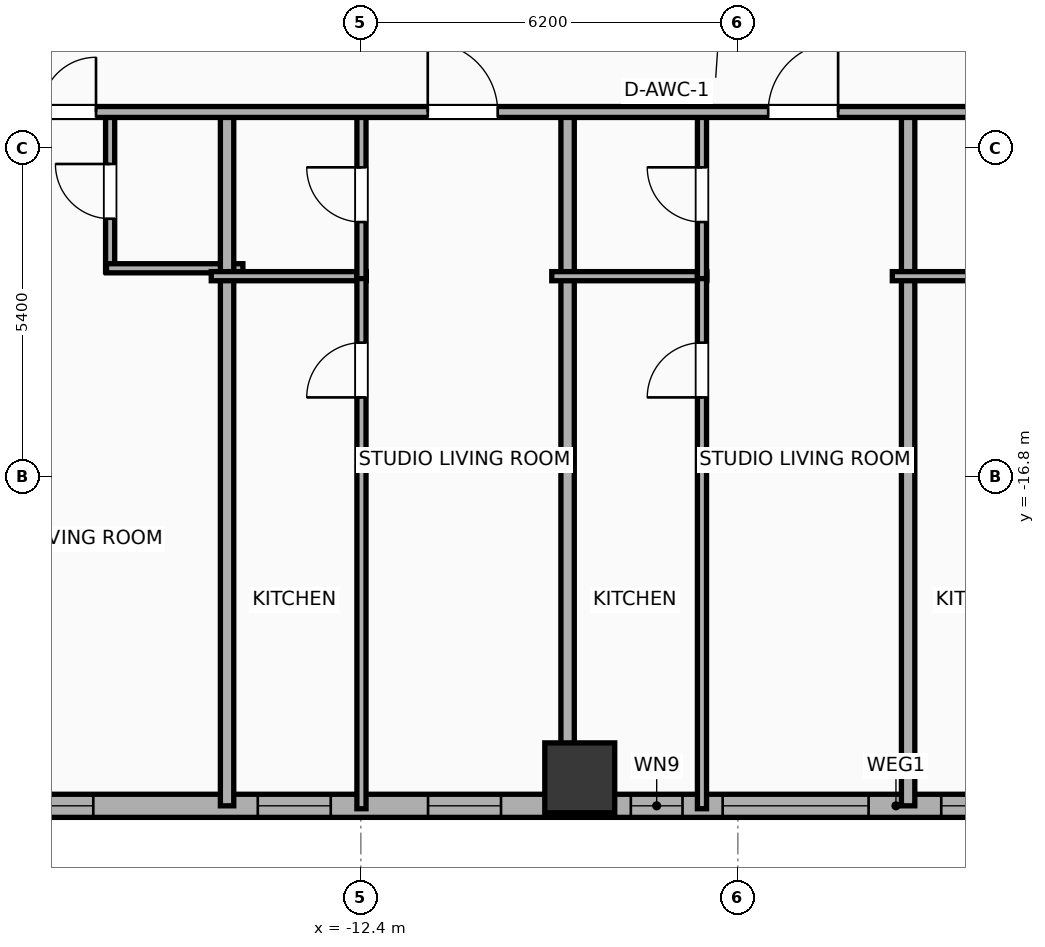
"""IFC4 building model, lengths in metres.
Left out: names, types, materials, properties, quantities, classifications, styles, units other than length and angle.
Written with IfcOpenShell. Run it as: python <this file> out.ifc"""

import sys

from ifc_helpers import new_model, si_unit, direction, frame, frame_2d, origin, origin_2d, place, context, subcontext, project, spatial, rectangle, hollow_rectangle, extrude, element, fill, save


model = new_model("IFC4")
c1 = context("Model", 3, precision=1e-05, world=origin(), true_north=direction((0.0, 1.0)))
c2 = subcontext(c1, "Body", "Model", "MODEL_VIEW")
j1 = project(units=[si_unit("LENGTHUNIT", "METRE"), si_unit("PLANEANGLEUNIT", "RADIAN")], contexts=[c1])
p1 = place(None, origin())
s1 = spatial("IfcSite", under=j1, at=p1, CompositionType="ELEMENT")
p2 = place(p1, origin())
s2 = spatial("IfcBuilding", under=s1, at=p2, CompositionType="ELEMENT")
p3 = place(p2, frame((0.0, 0.0, 29.9)))
s3 = spatial("IfcBuildingStorey", under=s2, at=p3, CompositionType="ELEMENT", Elevation=29.9)
p4 = place(p3, frame((-8.8, -21.75, 0.0), z_axis=(0.0, 0.0, 1.0), x_axis=(1.0, 0.0, 0.0)))
e1 = element("IfcColumn", 1, at=p4, inside=s3, PredefinedType="COLUMN", context=c2, shape_type="SweptSolid", body=[
    extrude(hollow_rectangle(XDim=1.15, YDim=1.15, WallThickness=0.04, at=origin_2d()), origin(), (0.0, 0.0, 1.0), 3.9),
])
p5 = place(p3, frame((22.381, -22.21, 0.0), z_axis=(0.0, 0.0, 1.0), x_axis=(-1.0, 0.0, 0.0)))
e2 = element("IfcWall", 2, at=p5, inside=s3, PredefinedType="ELEMENTEDWALL", context=c2, shape_type="SweptSolid", body=[
    extrude(rectangle(XDim=51.963, YDim=0.38, at=frame_2d((25.981, 0.0))), origin(), (0.0, 0.0, 1.0), 2.54),
])
p6 = place(p5, frame((5.81, 0.0, 0.75)))
e3 = element("IfcOpeningElement", 3, at=p6, cuts=e2, PredefinedType="OPENING", context=c2, shape_type="SweptSolid", body=[
    extrude(rectangle(XDim=2.4, YDim=1.63, at=frame_2d((1.2, 0.815))), frame((0.0, 0.2, 0.0), z_axis=(0.0, -1.0, 0.0), x_axis=(1.0, 0.0, 0.0)), (0.0, 0.0, 1.0), 0.4),
])
p7 = place(p5, frame((26.431, 0.0, 0.75)))
e4 = element("IfcOpeningElement", 4, at=p7, cuts=e2, PredefinedType="OPENING", context=c2, shape_type="SweptSolid", body=[
    extrude(rectangle(XDim=2.4, YDim=1.63, at=frame_2d((1.2, 0.815))), frame((0.0, 0.2, 0.0), z_axis=(0.0, -1.0, 0.0), x_axis=(1.0, 0.0, 0.0)), (0.0, 0.0, 1.0), 0.4),
])
p8 = place(p5, frame((42.952, 0.0, 0.75)))
e5 = element("IfcOpeningElement", 5, at=p8, cuts=e2, PredefinedType="OPENING", context=c2, shape_type="SweptSolid", body=[
    extrude(rectangle(XDim=2.4, YDim=1.63, at=frame_2d((1.2, 0.815))), frame((0.0, 0.2, 0.0), z_axis=(0.0, -1.0, 0.0), x_axis=(1.0, 0.0, 0.0)), (0.0, 0.0, 1.0), 0.4),
])
p9 = place(p5, frame((49.027, 0.0, 0.75)))
e6 = element("IfcOpeningElement", 6, at=p9, cuts=e2, PredefinedType="OPENING", context=c2, shape_type="SweptSolid", body=[
    extrude(rectangle(XDim=1.2, YDim=1.63, at=frame_2d((0.6, 0.815))), frame((0.0, 0.2, 0.0), z_axis=(0.0, -1.0, 0.0), x_axis=(1.0, 0.0, 0.0)), (0.0, 0.0, 1.0), 0.4),
])
p10 = place(p5, frame((46.476, 0.0, 0.75)))
e7 = element("IfcOpeningElement", 7, at=p10, cuts=e2, PredefinedType="OPENING", context=c2, shape_type="SweptSolid", body=[
    extrude(rectangle(XDim=1.2, YDim=1.63, at=frame_2d((0.6, 0.815))), frame((0.0, 0.2, 0.0), z_axis=(0.0, -1.0, 0.0), x_axis=(1.0, 0.0, 0.0)), (0.0, 0.0, 1.0), 0.4),
])
p11 = place(p5, frame((39.181, 0.0, 0.75)))
e8 = element("IfcOpeningElement", 8, at=p11, cuts=e2, PredefinedType="OPENING", context=c2, shape_type="SweptSolid", body=[
    extrude(rectangle(XDim=1.2, YDim=1.63, at=frame_2d((0.6, 0.815))), frame((0.0, 0.2, 0.0), z_axis=(0.0, -1.0, 0.0), x_axis=(1.0, 0.0, 0.0)), (0.0, 0.0, 1.0), 0.4),
])
p12 = place(p5, frame((32.476, 0.0, 0.75)))
e9 = element("IfcOpeningElement", 9, at=p12, cuts=e2, PredefinedType="OPENING", context=c2, shape_type="SweptSolid", body=[
    extrude(rectangle(XDim=1.2, YDim=1.63, at=frame_2d((0.6, 0.815))), frame((0.0, 0.2, 0.0), z_axis=(0.0, -1.0, 0.0), x_axis=(1.0, 0.0, 0.0)), (0.0, 0.0, 1.0), 0.4),
])
p13 = place(p5, frame((35.276, 0.0, 0.75)))
e10 = element("IfcOpeningElement", 10, at=p13, cuts=e2, PredefinedType="OPENING", context=c2, shape_type="SweptSolid", body=[
    extrude(rectangle(XDim=1.2, YDim=1.63, at=frame_2d((0.6, 0.815))), frame((0.0, 0.2, 0.0), z_axis=(0.0, -1.0, 0.0), x_axis=(1.0, 0.0, 0.0)), (0.0, 0.0, 1.0), 0.4),
])
p14 = place(p5, frame((29.491, 0.0, 0.75)))
e11 = element("IfcOpeningElement", 11, at=p14, cuts=e2, PredefinedType="OPENING", context=c2, shape_type="SweptSolid", body=[
    extrude(rectangle(XDim=0.85, YDim=1.63, at=frame_2d((0.425, 0.815))), frame((0.0, 0.2, 0.0), z_axis=(0.0, -1.0, 0.0), x_axis=(1.0, 0.0, 0.0)), (0.0, 0.0, 1.0), 0.4),
])
p15 = place(p5, frame((21.596, 0.0, 0.75)))
e12 = element("IfcOpeningElement", 12, at=p15, cuts=e2, PredefinedType="OPENING", context=c2, shape_type="SweptSolid", body=[
    extrude(rectangle(XDim=1.2, YDim=1.63, at=frame_2d((0.6, 0.815))), frame((0.0, 0.2, 0.0), z_axis=(0.0, -1.0, 0.0), x_axis=(1.0, 0.0, 0.0)), (0.0, 0.0, 1.0), 0.4),
])
p16 = place(p5, frame((24.036, 0.0, 0.75)))
e13 = element("IfcOpeningElement", 13, at=p16, cuts=e2, PredefinedType="OPENING", context=c2, shape_type="SweptSolid", body=[
    extrude(rectangle(XDim=1.2, YDim=1.63, at=frame_2d((0.6, 0.815))), frame((0.0, 0.2, 0.0), z_axis=(0.0, -1.0, 0.0), x_axis=(1.0, 0.0, 0.0)), (0.0, 0.0, 1.0), 0.4),
])
p17 = place(p5, frame((17.886, 0.0, 0.75)))
e14 = element("IfcOpeningElement", 14, at=p17, cuts=e2, PredefinedType="OPENING", context=c2, shape_type="SweptSolid", body=[
    extrude(rectangle(XDim=1.2, YDim=1.63, at=frame_2d((0.6, 0.815))), frame((0.0, 0.2, 0.0), z_axis=(0.0, -1.0, 0.0), x_axis=(1.0, 0.0, 0.0)), (0.0, 0.0, 1.0), 0.4),
])
p18 = place(p5, frame((15.086, 0.0, 0.75)))
e15 = element("IfcOpeningElement", 15, at=p18, cuts=e2, PredefinedType="OPENING", context=c2, shape_type="SweptSolid", body=[
    extrude(rectangle(XDim=1.2, YDim=1.63, at=frame_2d((0.6, 0.815))), frame((0.0, 0.2, 0.0), z_axis=(0.0, -1.0, 0.0), x_axis=(1.0, 0.0, 0.0)), (0.0, 0.0, 1.0), 0.4),
])
p19 = place(p5, frame((11.181, 0.0, 0.75)))
e16 = element("IfcOpeningElement", 16, at=p19, cuts=e2, PredefinedType="OPENING", context=c2, shape_type="SweptSolid", body=[
    extrude(rectangle(XDim=1.2, YDim=1.63, at=frame_2d((0.6, 0.815))), frame((0.0, 0.2, 0.0), z_axis=(0.0, -1.0, 0.0), x_axis=(1.0, 0.0, 0.0)), (0.0, 0.0, 1.0), 0.4),
])
p20 = place(p5, frame((3.886, 0.0, 0.75)))
e17 = element("IfcOpeningElement", 17, at=p20, cuts=e2, PredefinedType="OPENING", context=c2, shape_type="SweptSolid", body=[
    extrude(rectangle(XDim=1.2, YDim=1.63, at=frame_2d((0.6, 0.815))), frame((0.0, 0.2, 0.0), z_axis=(0.0, -1.0, 0.0), x_axis=(1.0, 0.0, 0.0)), (0.0, 0.0, 1.0), 0.4),
])
p21 = place(p5, frame((1.536, 0.0, 0.75)))
e18 = element("IfcOpeningElement", 18, at=p21, cuts=e2, PredefinedType="OPENING", context=c2, shape_type="SweptSolid", body=[
    extrude(rectangle(XDim=1.2, YDim=1.63, at=frame_2d((0.6, 0.815))), frame((0.0, 0.2, 0.0), z_axis=(0.0, -1.0, 0.0), x_axis=(1.0, 0.0, 0.0)), (0.0, 0.0, 1.0), 0.4),
])
p22 = place(p3, frame((-16.523, -13.43, 0.0), z_axis=(0.0, 0.0, 1.0), x_axis=(0.0, 1.0, 0.0)))
e19 = element("IfcWall", 19, at=p22, inside=s3, PredefinedType="PLUMBINGWALL", context=c2, shape_type="SweptSolid", body=[
    extrude(rectangle(XDim=2.65, YDim=0.15, at=frame_2d((1.325, 0.0))), origin(), (0.0, 0.0, 1.0), 3.65),
])
p23 = place(p22, frame((0.875, 0.0, 0.0)))
e20 = element("IfcOpeningElement", 20, at=p23, cuts=e19, PredefinedType="OPENING", context=c2, shape_type="SweptSolid", body=[
    extrude(rectangle(XDim=0.9, YDim=2.05, at=frame_2d((0.45, 1.025))), frame((0.0, 0.085, 0.0), z_axis=(0.0, -1.0, 0.0), x_axis=(1.0, 0.0, 0.0)), (0.0, 0.0, 1.0), 0.17),
])
p24 = place(p3, frame((-16.583, -13.37, 0.0), z_axis=(0.0, 0.0, 1.0), x_axis=(1.0, 0.0, 0.0)))
e21 = element("IfcWall", 21, at=p24, inside=s3, PredefinedType="PLUMBINGWALL", context=c2, shape_type="SweptSolid", body=[
    extrude(rectangle(XDim=2.243, YDim=0.15, at=frame_2d((1.122, 0.0))), origin(), (0.0, 0.0, 1.0), 3.65),
])
p25 = place(p3, frame((-14.6, -22.21, 0.0), z_axis=(0.0, 0.0, 1.0), x_axis=(0.0, 1.0, 0.0)))
e22 = element("IfcWall", 22, at=p25, inside=s3, PredefinedType="PARTITIONING", context=c2, shape_type="SweptSolid", body=[
    extrude(rectangle(XDim=11.49, YDim=0.22, at=frame_2d((5.745, 0.0))), origin(), (0.0, 0.0, 1.0), 3.65),
])
p26 = place(p3, frame((-14.86, -13.5, 0.0), z_axis=(0.0, 0.0, 1.0), x_axis=(1.0, 0.0, 0.0)))
e23 = element("IfcWall", 23, at=p26, inside=s3, PredefinedType="PLUMBINGWALL", context=c2, shape_type="SweptSolid", body=[
    extrude(rectangle(XDim=2.55, YDim=0.15, at=frame_2d((1.275, 0.0))), origin(), (0.0, 0.0, 1.0), 3.65),
])
p27 = place(p3, frame((-12.39, -22.258, 0.0), z_axis=(0.0, 0.0, 1.0), x_axis=(0.0, 1.0, 0.0)))
e24 = element("IfcWall", 24, at=p27, inside=s3, PredefinedType="PLUMBINGWALL", context=c2, shape_type="SweptSolid", body=[
    extrude(rectangle(XDim=8.798, YDim=0.15, at=frame_2d((4.399, 0.0))), origin(), (0.0, 0.0, 1.0), 3.65),
])
p28 = place(p27, frame((6.764, 0.0, 0.0)))
e25 = element("IfcOpeningElement", 25, at=p28, cuts=e24, PredefinedType="OPENING", context=c2, shape_type="SweptSolid", body=[
    extrude(rectangle(XDim=0.9, YDim=2.05, at=frame_2d((0.45, 1.025))), frame((0.0, 0.085, 0.0), z_axis=(0.0, -1.0, 0.0), x_axis=(1.0, 0.0, 0.0)), (0.0, 0.0, 1.0), 0.17),
])
p29 = place(p3, frame((-12.39, -13.54, 0.0), z_axis=(0.0, 0.0, 1.0), x_axis=(0.0, 1.0, 0.0)))
e26 = element("IfcWall", 26, at=p29, inside=s3, PredefinedType="PLUMBINGWALL", context=c2, shape_type="SweptSolid", body=[
    extrude(rectangle(XDim=2.76, YDim=0.15, at=frame_2d((1.38, 0.0))), origin(), (0.0, 0.0, 1.0), 3.65),
])
p30 = place(p29, frame((0.93, 0.0, 0.0)))
e27 = element("IfcOpeningElement", 27, at=p30, cuts=e26, PredefinedType="OPENING", context=c2, shape_type="SweptSolid", body=[
    extrude(rectangle(XDim=0.9, YDim=2.05, at=frame_2d((0.45, 1.025))), frame((0.0, 0.085, 0.0), z_axis=(0.0, -1.0, 0.0), x_axis=(1.0, 0.0, 0.0)), (0.0, 0.0, 1.0), 0.17),
])
p31 = place(p3, frame((-9.0, -22.21, 0.0), z_axis=(0.0, 0.0, 1.0), x_axis=(0.0, 1.0, 0.0)))
e28 = element("IfcWall", 28, at=p31, inside=s3, PredefinedType="PARTITIONING", context=c2, shape_type="SweptSolid", body=[
    extrude(rectangle(XDim=11.49, YDim=0.22, at=frame_2d((5.745, 0.0))), origin(), (0.0, 0.0, 1.0), 2.54),
])
p32 = place(p3, frame((-9.26, -13.5, 0.0), z_axis=(0.0, 0.0, 1.0), x_axis=(1.0, 0.0, 0.0)))
e29 = element("IfcWall", 29, at=p32, inside=s3, PredefinedType="PLUMBINGWALL", context=c2, shape_type="SweptSolid", body=[
    extrude(rectangle(XDim=2.55, YDim=0.15, at=frame_2d((1.275, 0.0))), origin(), (0.0, 0.0, 1.0), 3.65),
])
p33 = place(p3, frame((-6.79, -22.258, 0.0), z_axis=(0.0, 0.0, 1.0), x_axis=(0.0, 1.0, 0.0)))
e30 = element("IfcWall", 30, at=p33, inside=s3, PredefinedType="PLUMBINGWALL", context=c2, shape_type="SweptSolid", body=[
    extrude(rectangle(XDim=8.798, YDim=0.15, at=frame_2d((4.399, 0.0))), origin(), (0.0, 0.0, 1.0), 3.65),
])
p34 = place(p33, frame((6.764, 0.0, 0.0)))
e31 = element("IfcOpeningElement", 31, at=p34, cuts=e30, PredefinedType="OPENING", context=c2, shape_type="SweptSolid", body=[
    extrude(rectangle(XDim=0.9, YDim=2.05, at=frame_2d((0.45, 1.025))), frame((0.0, 0.085, 0.0), z_axis=(0.0, -1.0, 0.0), x_axis=(1.0, 0.0, 0.0)), (0.0, 0.0, 1.0), 0.17),
])
p35 = place(p3, frame((-6.79, -13.54, 0.0), z_axis=(0.0, 0.0, 1.0), x_axis=(0.0, 1.0, 0.0)))
e32 = element("IfcWall", 32, at=p35, inside=s3, PredefinedType="PLUMBINGWALL", context=c2, shape_type="SweptSolid", body=[
    extrude(rectangle(XDim=2.76, YDim=0.15, at=frame_2d((1.38, 0.0))), origin(), (0.0, 0.0, 1.0), 3.65),
])
p36 = place(p35, frame((0.93, 0.0, 0.0)))
e33 = element("IfcOpeningElement", 33, at=p36, cuts=e32, PredefinedType="OPENING", context=c2, shape_type="SweptSolid", body=[
    extrude(rectangle(XDim=0.9, YDim=2.05, at=frame_2d((0.45, 1.025))), frame((0.0, 0.085, 0.0), z_axis=(0.0, -1.0, 0.0), x_axis=(1.0, 0.0, 0.0)), (0.0, 0.0, 1.0), 0.17),
])
p37 = place(p3, frame((-3.4, -22.21, 0.0), z_axis=(0.0, 0.0, 1.0), x_axis=(0.0, 1.0, 0.0)))
e34 = element("IfcWall", 34, at=p37, inside=s3, PredefinedType="PARTITIONING", context=c2, shape_type="SweptSolid", body=[
    extrude(rectangle(XDim=11.49, YDim=0.22, at=frame_2d((5.745, 0.0))), origin(), (0.0, 0.0, 1.0), 3.65),
])
p38 = place(p3, frame((-3.66, -13.5, 0.0), z_axis=(0.0, 0.0, 1.0), x_axis=(1.0, 0.0, 0.0)))
e35 = element("IfcWall", 35, at=p38, inside=s3, PredefinedType="PLUMBINGWALL", context=c2, shape_type="SweptSolid", body=[
    extrude(rectangle(XDim=2.63, YDim=0.15, at=frame_2d((1.315, 0.0))), origin(), (0.0, 0.0, 1.0), 3.65),
])
p39 = place(p3, frame((-33.41, -10.8, 0.0), z_axis=(0.0, 0.0, 1.0), x_axis=(1.0, 0.0, 0.0)))
e36 = element("IfcWall", 36, at=p39, inside=s3, PredefinedType="PARTITIONING", context=c2, shape_type="SweptSolid", body=[
    extrude(rectangle(XDim=59.62, YDim=0.18, at=frame_2d((29.81, 0.0))), origin(), (0.0, 0.0, 1.0), 3.65),
])
p40 = place(p39, frame((3.36, 0.0, 0.0)))
e37 = element("IfcOpeningElement", 37, at=p40, cuts=e36, PredefinedType="OPENING", context=c2, shape_type="SweptSolid", body=[
    extrude(rectangle(XDim=1.15, YDim=2.05, at=frame_2d((0.575, 1.025))), frame((0.0, 0.1, 0.0), z_axis=(0.0, -1.0, 0.0), x_axis=(1.0, 0.0, 0.0)), (0.0, 0.0, 1.0), 0.2),
])
p41 = place(p39, frame((10.908, 0.0, 0.0)))
e38 = element("IfcOpeningElement", 38, at=p41, cuts=e36, PredefinedType="OPENING", context=c2, shape_type="SweptSolid", body=[
    extrude(rectangle(XDim=1.15, YDim=2.05, at=frame_2d((0.575, 1.025))), frame((0.0, 0.1, 0.0), z_axis=(0.0, -1.0, 0.0), x_axis=(1.0, 0.0, 0.0)), (0.0, 0.0, 1.0), 0.2),
])
p42 = place(p39, frame((15.755, 0.0, 0.0)))
e39 = element("IfcOpeningElement", 39, at=p42, cuts=e36, PredefinedType="OPENING", context=c2, shape_type="SweptSolid", body=[
    extrude(rectangle(XDim=0.9, YDim=2.05, at=frame_2d((0.45, 1.025))), frame((0.0, 0.1, 0.0), z_axis=(0.0, -1.0, 0.0), x_axis=(1.0, 0.0, 0.0)), (0.0, 0.0, 1.0), 0.2),
])
p43 = place(p39, frame((22.11, 0.0, 0.0)))
e40 = element("IfcOpeningElement", 40, at=p43, cuts=e36, PredefinedType="OPENING", context=c2, shape_type="SweptSolid", body=[
    extrude(rectangle(XDim=1.15, YDim=2.05, at=frame_2d((0.575, 1.025))), frame((0.0, 0.1, 0.0), z_axis=(0.0, -1.0, 0.0), x_axis=(1.0, 0.0, 0.0)), (0.0, 0.0, 1.0), 0.2),
])
p44 = place(p39, frame((27.709, 0.0, 0.0)))
e41 = element("IfcOpeningElement", 41, at=p44, cuts=e36, PredefinedType="OPENING", context=c2, shape_type="SweptSolid", body=[
    extrude(rectangle(XDim=1.15, YDim=2.05, at=frame_2d((0.575, 1.025))), frame((0.0, 0.1, 0.0), z_axis=(0.0, -1.0, 0.0), x_axis=(1.0, 0.0, 0.0)), (0.0, 0.0, 1.0), 0.2),
])
p45 = place(p39, frame((33.349, 0.0, 0.0)))
e42 = element("IfcOpeningElement", 42, at=p45, cuts=e36, PredefinedType="OPENING", context=c2, shape_type="SweptSolid", body=[
    extrude(rectangle(XDim=1.15, YDim=2.05, at=frame_2d((0.575, 1.025))), frame((0.0, 0.1, 0.0), z_axis=(0.0, -1.0, 0.0), x_axis=(1.0, 0.0, 0.0)), (0.0, 0.0, 1.0), 0.2),
])
p46 = place(p39, frame((36.759, 0.0, 0.0)))
e43 = element("IfcOpeningElement", 43, at=p46, cuts=e36, PredefinedType="OPENING", context=c2, shape_type="SweptSolid", body=[
    extrude(rectangle(XDim=1.15, YDim=2.05, at=frame_2d((0.575, 1.025))), frame((0.0, 0.1, 0.0), z_axis=(0.0, -1.0, 0.0), x_axis=(1.0, 0.0, 0.0)), (0.0, 0.0, 1.0), 0.2),
])
p47 = place(p39, frame((43.752, 0.0, 0.0)))
e44 = element("IfcOpeningElement", 44, at=p47, cuts=e36, PredefinedType="OPENING", context=c2, shape_type="SweptSolid", body=[
    extrude(rectangle(XDim=0.9, YDim=2.05, at=frame_2d((0.45, 1.025))), frame((0.0, 0.1, 0.0), z_axis=(0.0, -1.0, 0.0), x_axis=(1.0, 0.0, 0.0)), (0.0, 0.0, 1.0), 0.2),
])
p48 = place(p39, frame((47.962, 0.0, 0.0)))
e45 = element("IfcOpeningElement", 45, at=p48, cuts=e36, PredefinedType="OPENING", context=c2, shape_type="SweptSolid", body=[
    extrude(rectangle(XDim=1.15, YDim=2.05, at=frame_2d((0.575, 1.025))), frame((0.0, 0.1, 0.0), z_axis=(0.0, -1.0, 0.0), x_axis=(1.0, 0.0, 0.0)), (0.0, 0.0, 1.0), 0.2),
])
p49 = place(p39, frame((55.641, 0.0, 0.0)))
e46 = element("IfcOpeningElement", 46, at=p49, cuts=e36, PredefinedType="OPENING", context=c2, shape_type="SweptSolid", body=[
    extrude(rectangle(XDim=1.15, YDim=2.05, at=frame_2d((0.575, 1.025))), frame((0.0, 0.1, 0.0), z_axis=(0.0, -1.0, 0.0), x_axis=(1.0, 0.0, 0.0)), (0.0, 0.0, 1.0), 0.2),
])
p50 = place(p7, origin())
e47 = element("IfcWindow", 47, at=p50, inside=s3, PartitioningType="SINGLE_PANEL", PredefinedType="WINDOW", context=c2, shape_type="SweptSolid", body=[
    extrude(rectangle(XDim=2.4, YDim=1.63, at=frame_2d((1.2, 0.815))), frame((0.0, 0.03, 0.0), z_axis=(0.0, -1.0, 0.0), x_axis=(1.0, 0.0, 0.0)), (0.0, 0.0, 1.0), 0.06),
])
fill(e4, e47)
p51 = place(p11, origin())
e48 = element("IfcWindow", 48, at=p51, inside=s3, PartitioningType="SINGLE_PANEL", PredefinedType="WINDOW", context=c2, shape_type="SweptSolid", body=[
    extrude(rectangle(XDim=1.2, YDim=1.63, at=frame_2d((0.6, 0.815))), frame((0.0, 0.03, 0.0), z_axis=(0.0, -1.0, 0.0), x_axis=(1.0, 0.0, 0.0)), (0.0, 0.0, 1.0), 0.06),
])
fill(e8, e48)
p52 = place(p12, origin())
e49 = element("IfcWindow", 49, at=p52, inside=s3, PartitioningType="SINGLE_PANEL", PredefinedType="WINDOW", context=c2, shape_type="SweptSolid", body=[
    extrude(rectangle(XDim=1.2, YDim=1.63, at=frame_2d((0.6, 0.815))), frame((0.0, 0.03, 0.0), z_axis=(0.0, -1.0, 0.0), x_axis=(1.0, 0.0, 0.0)), (0.0, 0.0, 1.0), 0.06),
])
fill(e9, e49)
p53 = place(p13, origin())
e50 = element("IfcWindow", 50, at=p53, inside=s3, PartitioningType="SINGLE_PANEL", PredefinedType="WINDOW", context=c2, shape_type="SweptSolid", body=[
    extrude(rectangle(XDim=1.2, YDim=1.63, at=frame_2d((0.6, 0.815))), frame((0.0, 0.03, 0.0), z_axis=(0.0, -1.0, 0.0), x_axis=(1.0, 0.0, 0.0)), (0.0, 0.0, 1.0), 0.06),
])
fill(e10, e50)
p54 = place(p14, origin())
e51 = element("IfcWindow", 51, at=p54, inside=s3, PartitioningType="SINGLE_PANEL", PredefinedType="WINDOW", context=c2, shape_type="SweptSolid", body=[
    extrude(rectangle(XDim=0.85, YDim=1.63, at=frame_2d((0.425, 0.815))), frame((0.0, 0.03, 0.0), z_axis=(0.0, -1.0, 0.0), x_axis=(1.0, 0.0, 0.0)), (0.0, 0.0, 1.0), 0.06),
])
fill(e11, e51)
p55 = place(p16, origin())
e52 = element("IfcWindow", 52, at=p55, inside=s3, PartitioningType="SINGLE_PANEL", PredefinedType="WINDOW", context=c2, shape_type="SweptSolid", body=[
    extrude(rectangle(XDim=1.2, YDim=1.63, at=frame_2d((0.6, 0.815))), frame((0.0, 0.03, 0.0), z_axis=(0.0, -1.0, 0.0), x_axis=(1.0, 0.0, 0.0)), (0.0, 0.0, 1.0), 0.06),
])
fill(e13, e52)
p56 = place(p23, origin())
e53 = element("IfcDoor", 53, at=p56, inside=s3, OperationType="SINGLE_SWING_RIGHT", PredefinedType="DOOR", context=c2, shape_type="SweptSolid", body=[
    extrude(rectangle(XDim=0.9, YDim=2.05, at=frame_2d((0.45, 1.025))), frame((0.0, 0.025, 0.0), z_axis=(0.0, -1.0, 0.0), x_axis=(1.0, 0.0, 0.0)), (0.0, 0.0, 1.0), 0.05),
])
fill(e20, e53)
p57 = place(p28, origin())
e54 = element("IfcDoor", 54, at=p57, inside=s3, OperationType="SINGLE_SWING_LEFT", PredefinedType="DOOR", context=c2, shape_type="SweptSolid", body=[
    extrude(rectangle(XDim=0.9, YDim=2.05, at=frame_2d((0.45, 1.025))), frame((0.0, 0.025, 0.0), z_axis=(0.0, -1.0, 0.0), x_axis=(1.0, 0.0, 0.0)), (0.0, 0.0, 1.0), 0.05),
])
fill(e25, e54)
p58 = place(p30, origin())
e55 = element("IfcDoor", 55, at=p58, inside=s3, OperationType="SINGLE_SWING_RIGHT", PredefinedType="DOOR", context=c2, shape_type="SweptSolid", body=[
    extrude(rectangle(XDim=0.9, YDim=2.05, at=frame_2d((0.45, 1.025))), frame((0.0, 0.025, 0.0), z_axis=(0.0, -1.0, 0.0), x_axis=(1.0, 0.0, 0.0)), (0.0, 0.0, 1.0), 0.05),
])
fill(e27, e55)
p59 = place(p34, origin())
e56 = element("IfcDoor", 56, at=p59, inside=s3, OperationType="SINGLE_SWING_LEFT", PredefinedType="DOOR", context=c2, shape_type="SweptSolid", body=[
    extrude(rectangle(XDim=0.9, YDim=2.05, at=frame_2d((0.45, 1.025))), frame((0.0, 0.025, 0.0), z_axis=(0.0, -1.0, 0.0), x_axis=(1.0, 0.0, 0.0)), (0.0, 0.0, 1.0), 0.05),
])
fill(e31, e56)
p60 = place(p36, origin())
e57 = element("IfcDoor", 57, at=p60, inside=s3, OperationType="SINGLE_SWING_RIGHT", PredefinedType="DOOR", context=c2, shape_type="SweptSolid", body=[
    extrude(rectangle(XDim=0.9, YDim=2.05, at=frame_2d((0.45, 1.025))), frame((0.0, 0.025, 0.0), z_axis=(0.0, -1.0, 0.0), x_axis=(1.0, 0.0, 0.0)), (0.0, 0.0, 1.0), 0.05),
])
fill(e33, e57)
p61 = place(p42, origin())
e58 = element("IfcDoor", 58, at=p61, inside=s3, OperationType="SINGLE_SWING_RIGHT", PredefinedType="DOOR", context=c2, shape_type="SweptSolid", body=[
    extrude(rectangle(XDim=0.9, YDim=2.05, at=frame_2d((0.45, 1.025))), frame((0.0, 0.025, 0.0), z_axis=(0.0, -1.0, 0.0), x_axis=(1.0, 0.0, 0.0)), (0.0, 0.0, 1.0), 0.05),
])
fill(e39, e58)
p62 = place(p43, origin())
e59 = element("IfcDoor", 59, at=p62, inside=s3, OperationType="SINGLE_SWING_LEFT", PredefinedType="DOOR", context=c2, shape_type="SweptSolid", body=[
    extrude(rectangle(XDim=1.15, YDim=2.05, at=frame_2d((0.575, 1.025))), frame((0.0, 0.025, 0.0), z_axis=(0.0, -1.0, 0.0), x_axis=(1.0, 0.0, 0.0)), (0.0, 0.0, 1.0), 0.05),
])
fill(e40, e59)
p63 = place(p44, origin())
e60 = element("IfcDoor", 60, at=p63, inside=s3, OperationType="SINGLE_SWING_RIGHT", PredefinedType="DOOR", context=c2, shape_type="SweptSolid", body=[
    extrude(rectangle(XDim=1.15, YDim=2.05, at=frame_2d((0.575, 1.025))), frame((0.0, 0.025, 0.0), z_axis=(0.0, -1.0, 0.0), x_axis=(1.0, 0.0, 0.0)), (0.0, 0.0, 1.0), 0.05),
])
fill(e41, e60)
save(model, sys.argv[1])
